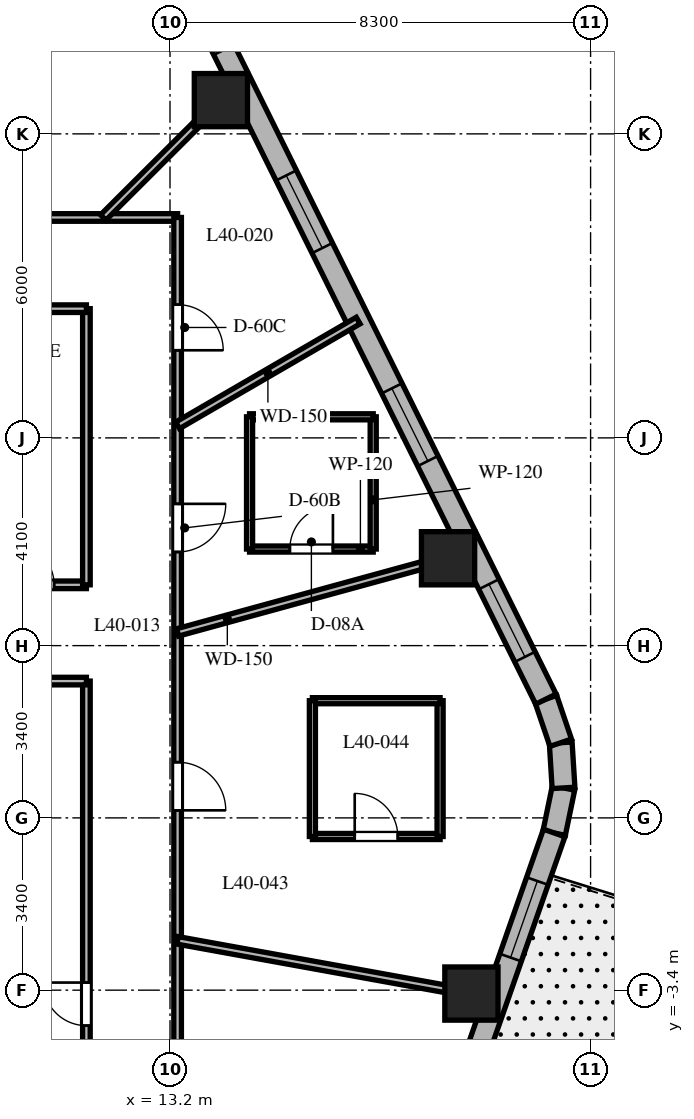
"""IFC4 building model, lengths in metres.
Left out: names, types, materials, properties, quantities, classifications, styles, units other than length and angle.
Written with IfcOpenShell. Run it as: python <this file> out.ifc"""

import sys

from ifc_helpers import new_model, si_unit, direction, frame, frame_2d, origin, origin_2d, place, context, subcontext, project, spatial, rectangle, extrude, element, fill, save


model = new_model("IFC4")
c1 = context("Model", 3, precision=1e-05, world=origin(), true_north=direction((0.0, 1.0)))
c2 = subcontext(c1, "Body", "Model", "MODEL_VIEW")
j1 = project(units=[si_unit("LENGTHUNIT", "METRE"), si_unit("PLANEANGLEUNIT", "RADIAN")], contexts=[c1])
p1 = place(None, origin())
s1 = spatial("IfcSite", under=j1, at=p1, CompositionType="ELEMENT")
p2 = place(p1, origin())
s2 = spatial("IfcBuilding", under=s1, at=p2, CompositionType="ELEMENT")
p3 = place(p2, frame((0.0, 0.0, 162.8)))
s3 = spatial("IfcBuildingStorey", under=s2, at=p3, CompositionType="ELEMENT", Elevation=162.8)
for number, where, z_axis, x_axis in (
    (1, (19.148, -3.467, 0.0), (0.0, 0.0, 1.0), (1.0, 0.0, 0.0)),
    (2, (18.687, 5.124, 0.0), (0.0, 0.0, 1.0), (1.0, 0.0, 0.0)),
    (3, (14.204, 14.166, 0.0), (0.0, 0.0, 1.0), (1.0, 0.0, 0.0)),
):
    element("IfcColumn", number, at=place(p3, frame(where, z_axis=z_axis, x_axis=x_axis)), inside=s3, PredefinedType="COLUMN", context=c2, shape_type="SweptSolid", body=[
        extrude(rectangle(XDim=1.05, YDim=1.05, at=origin_2d()), origin(), (0.0, 0.0, 1.0), 3.7),
    ])
p4 = place(p3, frame((20.782, -0.298, 0.0), z_axis=(0.0, 0.0, 1.0), x_axis=(0.202570068411, 0.979267771033, 0.0)))
e4 = element("IfcWall", 4, at=p4, inside=s3, PredefinedType="SOLIDWALL", context=c2, shape_type="SweptSolid", body=[
    extrude(rectangle(XDim=0.909, YDim=0.45, at=frame_2d((0.454, 0.0))), origin(), (0.0, 0.0, 1.0), 3.4),
])
p5 = place(p3, frame((20.966, 0.592, 0.0), z_axis=(0.0, 0.0, 1.0), x_axis=(-0.061748898935, 0.998091715966, 0.0)))
e5 = element("IfcWall", 5, at=p5, inside=s3, PredefinedType="SOLIDWALL", context=c2, shape_type="SweptSolid", body=[
    extrude(rectangle(XDim=0.894, YDim=0.45, at=frame_2d((0.447, 0.0))), origin(), (0.0, 0.0, 1.0), 3.4),
])
p6 = place(p3, frame((20.911, 1.484, 0.0), z_axis=(0.0, 0.0, 1.0), x_axis=(-0.321623334353, 0.946867694453, 0.0)))
e6 = element("IfcWall", 6, at=p6, inside=s3, PredefinedType="SOLIDWALL", context=c2, shape_type="SweptSolid", body=[
    extrude(rectangle(XDim=0.909, YDim=0.45, at=frame_2d((0.454, 0.0))), origin(), (0.0, 0.0, 1.0), 3.4),
])
p7 = place(p3, frame((14.937, -16.993, 0.0), z_axis=(0.0, 0.0, 1.0), x_axis=(0.330431575061, 0.943829949834, 0.0)))
e7 = element("IfcWall", 7, at=p7, inside=s3, PredefinedType="SOLIDWALL", context=c2, shape_type="SweptSolid", body=[
    extrude(rectangle(XDim=17.689, YDim=0.45, at=frame_2d((8.844, 0.0))), origin(), (0.0, 0.0, 1.0), 3.4),
])
p8 = place(p7, frame((4.807, 0.0, 0.0)))
e8 = element("IfcOpeningElement", 8, at=p8, cuts=e7, PredefinedType="OPENING", context=c2, shape_type="SweptSolid", body=[
    extrude(rectangle(XDim=0.95, YDim=2.15, at=frame_2d((0.475, 1.075))), frame((0.0, 0.235, 0.0), z_axis=(0.0, -1.0, 0.0), x_axis=(1.0, 0.0, 0.0)), (0.0, 0.0, 1.0), 0.47),
])
p9 = place(p7, frame((0.95, 0.0, 0.8)))
e9 = element("IfcOpeningElement", 9, at=p9, cuts=e7, PredefinedType="OPENING", context=c2, shape_type="SweptSolid", body=[
    extrude(rectangle(XDim=1.6, YDim=1.75, at=frame_2d((0.8, 0.875))), frame((0.0, 0.235, 0.0), z_axis=(0.0, -1.0, 0.0), x_axis=(1.0, 0.0, 0.0)), (0.0, 0.0, 1.0), 0.47),
])
p10 = place(p7, frame((7.99, 0.0, 0.8)))
e10 = element("IfcOpeningElement", 10, at=p10, cuts=e7, PredefinedType="OPENING", context=c2, shape_type="SweptSolid", body=[
    extrude(rectangle(XDim=1.6, YDim=1.75, at=frame_2d((0.8, 0.875))), frame((0.0, 0.235, 0.0), z_axis=(0.0, -1.0, 0.0), x_axis=(1.0, 0.0, 0.0)), (0.0, 0.0, 1.0), 0.47),
])
p11 = place(p7, frame((15.084, 0.0, 0.8)))
e11 = element("IfcOpeningElement", 11, at=p11, cuts=e7, PredefinedType="OPENING", context=c2, shape_type="SweptSolid", body=[
    extrude(rectangle(XDim=1.6, YDim=1.75, at=frame_2d((0.8, 0.875))), frame((0.0, 0.235, 0.0), z_axis=(0.0, -1.0, 0.0), x_axis=(1.0, 0.0, 0.0)), (0.0, 0.0, 1.0), 0.47),
])
p12 = place(p3, frame((20.618, 2.344, 0.0), z_axis=(0.0, 0.0, 1.0), x_axis=(-0.444243691097, 0.895905990002, 0.0)))
e12 = element("IfcWall", 12, at=p12, inside=s3, PredefinedType="SOLIDWALL", context=c2, shape_type="SweptSolid", body=[
    extrude(rectangle(XDim=16.784, YDim=0.45, at=frame_2d((8.392, 0.0))), origin(), (0.0, 0.0, 1.0), 3.4),
])
p13 = place(p12, frame((5.245, 0.0, 0.8)))
e13 = element("IfcOpeningElement", 13, at=p13, cuts=e12, PredefinedType="OPENING", context=c2, shape_type="SweptSolid", body=[
    extrude(rectangle(XDim=1.6, YDim=1.75, at=frame_2d((0.8, 0.875))), frame((0.0, 0.235, 0.0), z_axis=(0.0, -1.0, 0.0), x_axis=(1.0, 0.0, 0.0)), (0.0, 0.0, 1.0), 0.47),
])
p14 = place(p12, frame((9.936, 0.0, 0.8)))
e14 = element("IfcOpeningElement", 14, at=p14, cuts=e12, PredefinedType="OPENING", context=c2, shape_type="SweptSolid", body=[
    extrude(rectangle(XDim=1.6, YDim=1.75, at=frame_2d((0.8, 0.875))), frame((0.0, 0.235, 0.0), z_axis=(0.0, -1.0, 0.0), x_axis=(1.0, 0.0, 0.0)), (0.0, 0.0, 1.0), 0.47),
])
p15 = place(p12, frame((14.303, 0.0, 0.8)))
e15 = element("IfcOpeningElement", 15, at=p15, cuts=e12, PredefinedType="OPENING", context=c2, shape_type="SweptSolid", body=[
    extrude(rectangle(XDim=1.6, YDim=1.75, at=frame_2d((0.8, 0.875))), frame((0.0, 0.235, 0.0), z_axis=(0.0, -1.0, 0.0), x_axis=(1.0, 0.0, 0.0)), (0.0, 0.0, 1.0), 0.47),
])
p16 = place(p12, frame((0.931, 0.0, 0.8)))
e16 = element("IfcOpeningElement", 16, at=p16, cuts=e12, PredefinedType="OPENING", context=c2, shape_type="SweptSolid", body=[
    extrude(rectangle(XDim=1.6, YDim=1.75, at=frame_2d((0.8, 0.875))), frame((0.0, 0.235, 0.0), z_axis=(0.0, -1.0, 0.0), x_axis=(1.0, 0.0, 0.0)), (0.0, 0.0, 1.0), 0.47),
])
p17 = place(p3, frame((-13.35, 11.85, 0.0), z_axis=(0.0, 0.0, 1.0), x_axis=(1.0, 0.0, 0.0)))
e17 = element("IfcWall", 17, at=p17, inside=s3, PredefinedType="PARTITIONING", context=c2, shape_type="SweptSolid", body=[
    extrude(rectangle(XDim=26.7, YDim=0.15, at=frame_2d((13.35, 0.0))), origin(), (0.0, 0.0, 1.0), 2.84),
])
p18 = place(p17, frame((20.682, 0.0, 0.0)))
e18 = element("IfcOpeningElement", 18, at=p18, cuts=e17, PredefinedType="OPENING", context=c2, shape_type="SweptSolid", body=[
    extrude(rectangle(XDim=0.95, YDim=2.03, at=frame_2d((0.475, 1.015))), frame((0.0, 0.085, 0.0), z_axis=(0.0, -1.0, 0.0), x_axis=(1.0, 0.0, 0.0)), (0.0, 0.0, 1.0), 0.17),
])
p19 = place(p17, frame((14.708, 0.0, 0.0)))
e19 = element("IfcOpeningElement", 19, at=p19, cuts=e17, PredefinedType="OPENING", context=c2, shape_type="SweptSolid", body=[
    extrude(rectangle(XDim=0.95, YDim=2.03, at=frame_2d((0.475, 1.015))), frame((0.0, 0.085, 0.0), z_axis=(0.0, -1.0, 0.0), x_axis=(1.0, 0.0, 0.0)), (0.0, 0.0, 1.0), 0.17),
])
p20 = place(p17, frame((10.553, 0.0, 0.0)))
e20 = element("IfcOpeningElement", 20, at=p20, cuts=e17, PredefinedType="OPENING", context=c2, shape_type="SweptSolid", body=[
    extrude(rectangle(XDim=0.95, YDim=2.03, at=frame_2d((0.475, 1.015))), frame((0.0, 0.085, 0.0), z_axis=(0.0, -1.0, 0.0), x_axis=(1.0, 0.0, 0.0)), (0.0, 0.0, 1.0), 0.17),
])
p21 = place(p17, frame((3.995, 0.0, 0.0)))
e21 = element("IfcOpeningElement", 21, at=p21, cuts=e17, PredefinedType="OPENING", context=c2, shape_type="SweptSolid", body=[
    extrude(rectangle(XDim=0.95, YDim=2.03, at=frame_2d((0.475, 1.015))), frame((0.0, 0.085, 0.0), z_axis=(0.0, -1.0, 0.0), x_axis=(1.0, 0.0, 0.0)), (0.0, 0.0, 1.0), 0.17),
])
p22 = place(p3, frame((13.35, 11.85, 0.0), z_axis=(0.0, 0.0, 1.0), x_axis=(0.0, -1.0, 0.0)))
e22 = element("IfcWall", 22, at=p22, inside=s3, PredefinedType="PARTITIONING", context=c2, shape_type="SweptSolid", body=[
    extrude(rectangle(XDim=23.7, YDim=0.15, at=frame_2d((11.85, 0.0))), origin(), (0.0, 0.0, 1.0), 2.84),
])
p23 = place(p22, frame((5.652, 0.0, 0.0)))
e23 = element("IfcOpeningElement", 23, at=p23, cuts=e22, PredefinedType="OPENING", context=c2, shape_type="SweptSolid", body=[
    extrude(rectangle(XDim=0.95, YDim=2.03, at=frame_2d((0.475, 1.015))), frame((0.0, 0.085, 0.0), z_axis=(0.0, -1.0, 0.0), x_axis=(1.0, 0.0, 0.0)), (0.0, 0.0, 1.0), 0.17),
])
p24 = place(p22, frame((1.721, 0.0, 0.0)))
e24 = element("IfcOpeningElement", 24, at=p24, cuts=e22, PredefinedType="OPENING", context=c2, shape_type="SweptSolid", body=[
    extrude(rectangle(XDim=0.9, YDim=2.03, at=frame_2d((0.45, 1.015))), frame((0.0, 0.085, 0.0), z_axis=(0.0, -1.0, 0.0), x_axis=(1.0, 0.0, 0.0)), (0.0, 0.0, 1.0), 0.17),
])
p25 = place(p22, frame((18.389, 0.0, 0.0)))
e25 = element("IfcOpeningElement", 25, at=p25, cuts=e22, PredefinedType="OPENING", context=c2, shape_type="SweptSolid", body=[
    extrude(rectangle(XDim=0.95, YDim=2.03, at=frame_2d((0.475, 1.015))), frame((0.0, 0.085, 0.0), z_axis=(0.0, -1.0, 0.0), x_axis=(1.0, 0.0, 0.0)), (0.0, 0.0, 1.0), 0.17),
])
p26 = place(p22, frame((10.751, 0.0, 0.0)))
e26 = element("IfcOpeningElement", 26, at=p26, cuts=e22, PredefinedType="OPENING", context=c2, shape_type="SweptSolid", body=[
    extrude(rectangle(XDim=0.95, YDim=2.03, at=frame_2d((0.475, 1.015))), frame((0.0, 0.085, 0.0), z_axis=(0.0, -1.0, 0.0), x_axis=(1.0, 0.0, 0.0)), (0.0, 0.0, 1.0), 0.17),
])
p27 = place(p3, frame((11.55, -10.05, 0.0), z_axis=(0.0, 0.0, 1.0), x_axis=(0.0, 1.0, 0.0)))
e27 = element("IfcWall", 27, at=p27, inside=s3, PredefinedType="PARTITIONING", context=c2, shape_type="SweptSolid", body=[
    extrude(rectangle(XDim=12.75, YDim=0.15, at=frame_2d((6.375, 0.0))), origin(), (0.0, 0.0, 1.0), 2.84),
])
p28 = place(p27, frame((5.95, 0.0, 0.0)))
e28 = element("IfcOpeningElement", 28, at=p28, cuts=e27, PredefinedType="OPENING", context=c2, shape_type="SweptSolid", body=[
    extrude(rectangle(XDim=0.85, YDim=2.03, at=frame_2d((0.425, 1.015))), frame((0.0, 0.085, 0.0), z_axis=(0.0, -1.0, 0.0), x_axis=(1.0, 0.0, 0.0)), (0.0, 0.0, 1.0), 0.17),
])
p29 = place(p3, frame((11.55, 2.7, 0.0), z_axis=(0.0, 0.0, 1.0), x_axis=(-1.0, 0.0, 0.0)))
e29 = element("IfcWall", 29, at=p29, inside=s3, PredefinedType="PARTITIONING", context=c2, shape_type="SweptSolid", body=[
    extrude(rectangle(XDim=2.125, YDim=0.15, at=frame_2d((1.062, 0.0))), origin(), (0.0, 0.0, 1.0), 3.4),
])
p30 = place(p3, frame((9.425, 4.6, 0.0), z_axis=(0.0, 0.0, 1.0), x_axis=(1.0, 0.0, 0.0)))
e30 = element("IfcWall", 30, at=p30, inside=s3, PredefinedType="PARTITIONING", context=c2, shape_type="SweptSolid", body=[
    extrude(rectangle(XDim=2.125, YDim=0.15, at=frame_2d((1.062, 0.0))), origin(), (0.0, 0.0, 1.0), 3.4),
])
p31 = place(p30, frame((0.637, 0.0, 0.0)))
e31 = element("IfcOpeningElement", 31, at=p31, cuts=e30, PredefinedType="OPENING", context=c2, shape_type="SweptSolid", body=[
    extrude(rectangle(XDim=0.85, YDim=2.03, at=frame_2d((0.425, 1.015))), frame((0.0, 0.085, 0.0), z_axis=(0.0, -1.0, 0.0), x_axis=(1.0, 0.0, 0.0)), (0.0, 0.0, 1.0), 0.17),
])
p32 = place(p3, frame((11.55, 4.6, 0.0), z_axis=(0.0, 0.0, 1.0), x_axis=(0.0, 1.0, 0.0)))
e32 = element("IfcWall", 32, at=p32, inside=s3, PredefinedType="PARTITIONING", context=c2, shape_type="SweptSolid", body=[
    extrude(rectangle(XDim=5.45, YDim=0.15, at=frame_2d((2.725, 0.0))), origin(), (0.0, 0.0, 1.0), 2.84),
])
p33 = place(p3, frame((11.55, 10.05, 0.0), z_axis=(0.0, 0.0, 1.0), x_axis=(-1.0, 0.0, 0.0)))
e33 = element("IfcWall", 33, at=p33, inside=s3, PredefinedType="PARTITIONING", context=c2, shape_type="SweptSolid", body=[
    extrude(rectangle(XDim=9.65, YDim=0.15, at=frame_2d((4.825, 0.0))), origin(), (0.0, 0.0, 1.0), 2.84),
])
p34 = place(p3, frame((13.35, 3.661, 0.0), z_axis=(0.0, 0.0, 1.0), x_axis=(0.964397145454, 0.264458211898, 0.0)))
e34 = element("IfcWall", 34, at=p34, inside=s3, PredefinedType="PARTITIONING", context=c2, shape_type="SweptSolid", body=[
    extrude(rectangle(XDim=6.039, YDim=0.15, at=frame_2d((3.019, 0.0))), origin(), (0.0, 0.0, 1.0), 2.64),
])
p35 = place(p3, frame((13.35, 7.748, 0.0), z_axis=(0.0, 0.0, 1.0), x_axis=(0.864894342526, 0.501953958313, 0.0)))
e35 = element("IfcWall", 35, at=p35, inside=s3, PredefinedType="PARTITIONING", context=c2, shape_type="SweptSolid", body=[
    extrude(rectangle(XDim=4.12, YDim=0.15, at=frame_2d((2.06, 0.0))), origin(), (0.0, 0.0, 1.0), 2.64),
])
p36 = place(p3, frame((11.882, 11.85, 0.0), z_axis=(0.0, 0.0, 1.0), x_axis=(0.708037373639, 0.706174962407, 0.0)))
e36 = element("IfcWall", 36, at=p36, inside=s3, PredefinedType="PARTITIONING", context=c2, shape_type="SweptSolid", body=[
    extrude(rectangle(XDim=3.802, YDim=0.15, at=frame_2d((1.901, 0.0))), origin(), (0.0, 0.0, 1.0), 2.64),
])
p37 = place(p3, frame((13.35, -2.417, 0.0), z_axis=(0.0, 0.0, 1.0), x_axis=(0.98399796473, -0.178179699761, 0.0)))
e37 = element("IfcWall", 37, at=p37, inside=s3, PredefinedType="PARTITIONING", context=c2, shape_type="SweptSolid", body=[
    extrude(rectangle(XDim=6.393, YDim=0.15, at=frame_2d((3.197, 0.0))), origin(), (0.0, 0.0, 1.0), 2.64),
])
p38 = place(p3, frame((14.77, 5.306, 0.0), z_axis=(0.0, 0.0, 1.0), x_axis=(1.0, 0.0, 0.0)))
e38 = element("IfcWall", 38, at=p38, inside=s3, PredefinedType="PARTITIONING", context=c2, shape_type="SweptSolid", body=[
    extrude(rectangle(XDim=2.44, YDim=0.12, at=frame_2d((1.22, 0.0))), origin(), (0.0, 0.0, 1.0), 2.84),
])
p39 = place(p38, frame((0.795, 0.0, 0.0)))
e39 = element("IfcOpeningElement", 39, at=p39, cuts=e38, PredefinedType="OPENING", context=c2, shape_type="SweptSolid", body=[
    extrude(rectangle(XDim=0.85, YDim=2.03, at=frame_2d((0.425, 1.015))), frame((0.0, 0.07, 0.0), z_axis=(0.0, -1.0, 0.0), x_axis=(1.0, 0.0, 0.0)), (0.0, 0.0, 1.0), 0.14),
])
p40 = place(p3, frame((17.21, 5.306, 0.0), z_axis=(0.0, 0.0, 1.0), x_axis=(0.0, 1.0, 0.0)))
e40 = element("IfcWall", 40, at=p40, inside=s3, PredefinedType="PARTITIONING", context=c2, shape_type="SweptSolid", body=[
    extrude(rectangle(XDim=2.61, YDim=0.12, at=frame_2d((1.305, 0.0))), origin(), (0.0, 0.0, 1.0), 2.64),
])
p41 = place(p3, frame((17.21, 7.916, 0.0), z_axis=(0.0, 0.0, 1.0), x_axis=(-1.0, 0.0, 0.0)))
e41 = element("IfcWall", 41, at=p41, inside=s3, PredefinedType="PARTITIONING", context=c2, shape_type="SweptSolid", body=[
    extrude(rectangle(XDim=2.44, YDim=0.12, at=frame_2d((1.22, 0.0))), origin(), (0.0, 0.0, 1.0), 2.64),
])
p42 = place(p3, frame((14.77, 7.916, 0.0), z_axis=(0.0, 0.0, 1.0), x_axis=(0.0, -1.0, 0.0)))
e42 = element("IfcWall", 42, at=p42, inside=s3, PredefinedType="PARTITIONING", context=c2, shape_type="SweptSolid", body=[
    extrude(rectangle(XDim=2.61, YDim=0.12, at=frame_2d((1.305, 0.0))), origin(), (0.0, 0.0, 1.0), 2.84),
])
p43 = place(p3, frame((16.01, -0.367, 0.0), z_axis=(0.0, 0.0, 1.0), x_axis=(1.0, 0.0, 0.0)))
e43 = element("IfcWall", 43, at=p43, inside=s3, PredefinedType="PARTITIONING", context=c2, shape_type="SweptSolid", body=[
    extrude(rectangle(XDim=2.52, YDim=0.12, at=frame_2d((1.26, 0.0))), origin(), (0.0, 0.0, 1.0), 3.4),
])
p44 = place(p43, frame((0.835, 0.0, 0.0)))
e44 = element("IfcOpeningElement", 44, at=p44, cuts=e43, PredefinedType="OPENING", context=c2, shape_type="SweptSolid", body=[
    extrude(rectangle(XDim=0.85, YDim=2.03, at=frame_2d((0.425, 1.015))), frame((0.0, 0.07, 0.0), z_axis=(0.0, -1.0, 0.0), x_axis=(1.0, 0.0, 0.0)), (0.0, 0.0, 1.0), 0.14),
])
p45 = place(p3, frame((18.53, -0.367, 0.0), z_axis=(0.0, 0.0, 1.0), x_axis=(0.0, 1.0, 0.0)))
e45 = element("IfcWall", 45, at=p45, inside=s3, PredefinedType="PARTITIONING", context=c2, shape_type="SweptSolid", body=[
    extrude(rectangle(XDim=2.68, YDim=0.12, at=frame_2d((1.34, 0.0))), origin(), (0.0, 0.0, 1.0), 2.64),
])
p46 = place(p3, frame((18.53, 2.313, 0.0), z_axis=(0.0, 0.0, 1.0), x_axis=(-1.0, 0.0, 0.0)))
e46 = element("IfcWall", 46, at=p46, inside=s3, PredefinedType="PARTITIONING", context=c2, shape_type="SweptSolid", body=[
    extrude(rectangle(XDim=2.52, YDim=0.12, at=frame_2d((1.26, 0.0))), origin(), (0.0, 0.0, 1.0), 3.4),
])
p47 = place(p3, frame((16.01, 2.313, 0.0), z_axis=(0.0, 0.0, 1.0), x_axis=(0.0, -1.0, 0.0)))
e47 = element("IfcWall", 47, at=p47, inside=s3, PredefinedType="PARTITIONING", context=c2, shape_type="SweptSolid", body=[
    extrude(rectangle(XDim=2.68, YDim=0.12, at=frame_2d((1.34, 0.0))), origin(), (0.0, 0.0, 1.0), 3.4),
])
p48 = place(p11, origin())
e48 = element("IfcWindow", 48, at=p48, inside=s3, PartitioningType="SINGLE_PANEL", PredefinedType="WINDOW", context=c2, shape_type="SweptSolid", body=[
    extrude(rectangle(XDim=1.6, YDim=1.75, at=frame_2d((0.8, 0.875))), frame((0.0, 0.03, 0.0), z_axis=(0.0, -1.0, 0.0), x_axis=(1.0, 0.0, 0.0)), (0.0, 0.0, 1.0), 0.06),
])
fill(e11, e48)
p49 = place(p13, origin())
e49 = element("IfcWindow", 49, at=p49, inside=s3, PartitioningType="SINGLE_PANEL", PredefinedType="WINDOW", context=c2, shape_type="SweptSolid", body=[
    extrude(rectangle(XDim=1.6, YDim=1.75, at=frame_2d((0.8, 0.875))), frame((0.0, 0.03, 0.0), z_axis=(0.0, -1.0, 0.0), x_axis=(1.0, 0.0, 0.0)), (0.0, 0.0, 1.0), 0.06),
])
fill(e13, e49)
p50 = place(p14, origin())
e50 = element("IfcWindow", 50, at=p50, inside=s3, PartitioningType="SINGLE_PANEL", PredefinedType="WINDOW", context=c2, shape_type="SweptSolid", body=[
    extrude(rectangle(XDim=1.6, YDim=1.75, at=frame_2d((0.8, 0.875))), frame((0.0, 0.03, 0.0), z_axis=(0.0, -1.0, 0.0), x_axis=(1.0, 0.0, 0.0)), (0.0, 0.0, 1.0), 0.06),
])
fill(e14, e50)
p51 = place(p16, origin())
e51 = element("IfcWindow", 51, at=p51, inside=s3, PartitioningType="SINGLE_PANEL", PredefinedType="WINDOW", context=c2, shape_type="SweptSolid", body=[
    extrude(rectangle(XDim=1.6, YDim=1.75, at=frame_2d((0.8, 0.875))), frame((0.0, 0.03, 0.0), z_axis=(0.0, -1.0, 0.0), x_axis=(1.0, 0.0, 0.0)), (0.0, 0.0, 1.0), 0.06),
])
fill(e16, e51)
p52 = place(p31, origin())
e52 = element("IfcDoor", 52, at=p52, inside=s3, OperationType="SINGLE_SWING_LEFT", PredefinedType="DOOR", context=c2, shape_type="SweptSolid", body=[
    extrude(rectangle(XDim=0.85, YDim=2.03, at=frame_2d((0.425, 1.015))), frame((0.0, 0.025, 0.0), z_axis=(0.0, -1.0, 0.0), x_axis=(1.0, 0.0, 0.0)), (0.0, 0.0, 1.0), 0.05),
])
fill(e31, e52)
p53 = place(p28, origin())
e53 = element("IfcDoor", 53, at=p53, inside=s3, OperationType="SINGLE_SWING_RIGHT", PredefinedType="DOOR", context=c2, shape_type="SweptSolid", body=[
    extrude(rectangle(XDim=0.85, YDim=2.03, at=frame_2d((0.425, 1.015))), frame((0.0, 0.025, 0.0), z_axis=(0.0, -1.0, 0.0), x_axis=(1.0, 0.0, 0.0)), (0.0, 0.0, 1.0), 0.05),
])
fill(e28, e53)
p54 = place(p23, origin())
e54 = element("IfcDoor", 54, at=p54, inside=s3, OperationType="SINGLE_SWING_LEFT", PredefinedType="DOOR", context=c2, shape_type="SweptSolid", body=[
    extrude(rectangle(XDim=0.95, YDim=2.03, at=frame_2d((0.475, 1.015))), frame((0.0, 0.025, 0.0), z_axis=(0.0, -1.0, 0.0), x_axis=(1.0, 0.0, 0.0)), (0.0, 0.0, 1.0), 0.05),
])
fill(e23, e54)
p55 = place(p39, origin())
e55 = element("IfcDoor", 55, at=p55, inside=s3, OperationType="SINGLE_SWING_RIGHT", PredefinedType="DOOR", context=c2, shape_type="SweptSolid", body=[
    extrude(rectangle(XDim=0.85, YDim=2.03, at=frame_2d((0.425, 1.015))), frame((0.0, 0.025, 0.0), z_axis=(0.0, -1.0, 0.0), x_axis=(1.0, 0.0, 0.0)), (0.0, 0.0, 1.0), 0.05),
])
fill(e39, e55)
p56 = place(p24, origin())
e56 = element("IfcDoor", 56, at=p56, inside=s3, OperationType="SINGLE_SWING_RIGHT", PredefinedType="DOOR", context=c2, shape_type="SweptSolid", body=[
    extrude(rectangle(XDim=0.9, YDim=2.03, at=frame_2d((0.45, 1.015))), frame((0.0, 0.025, 0.0), z_axis=(0.0, -1.0, 0.0), x_axis=(1.0, 0.0, 0.0)), (0.0, 0.0, 1.0), 0.05),
])
fill(e24, e56)
p57 = place(p26, origin())
e57 = element("IfcDoor", 57, at=p57, inside=s3, OperationType="SINGLE_SWING_RIGHT", PredefinedType="DOOR", context=c2, shape_type="SweptSolid", body=[
    extrude(rectangle(XDim=0.95, YDim=2.03, at=frame_2d((0.475, 1.015))), frame((0.0, 0.025, 0.0), z_axis=(0.0, -1.0, 0.0), x_axis=(1.0, 0.0, 0.0)), (0.0, 0.0, 1.0), 0.05),
])
fill(e26, e57)
p58 = place(p44, origin())
e58 = element("IfcDoor", 58, at=p58, inside=s3, OperationType="SINGLE_SWING_LEFT", PredefinedType="DOOR", context=c2, shape_type="SweptSolid", body=[
    extrude(rectangle(XDim=0.85, YDim=2.03, at=frame_2d((0.425, 1.015))), frame((0.0, 0.025, 0.0), z_axis=(0.0, -1.0, 0.0), x_axis=(1.0, 0.0, 0.0)), (0.0, 0.0, 1.0), 0.05),
])
fill(e44, e58)
save(model, sys.argv[1])
